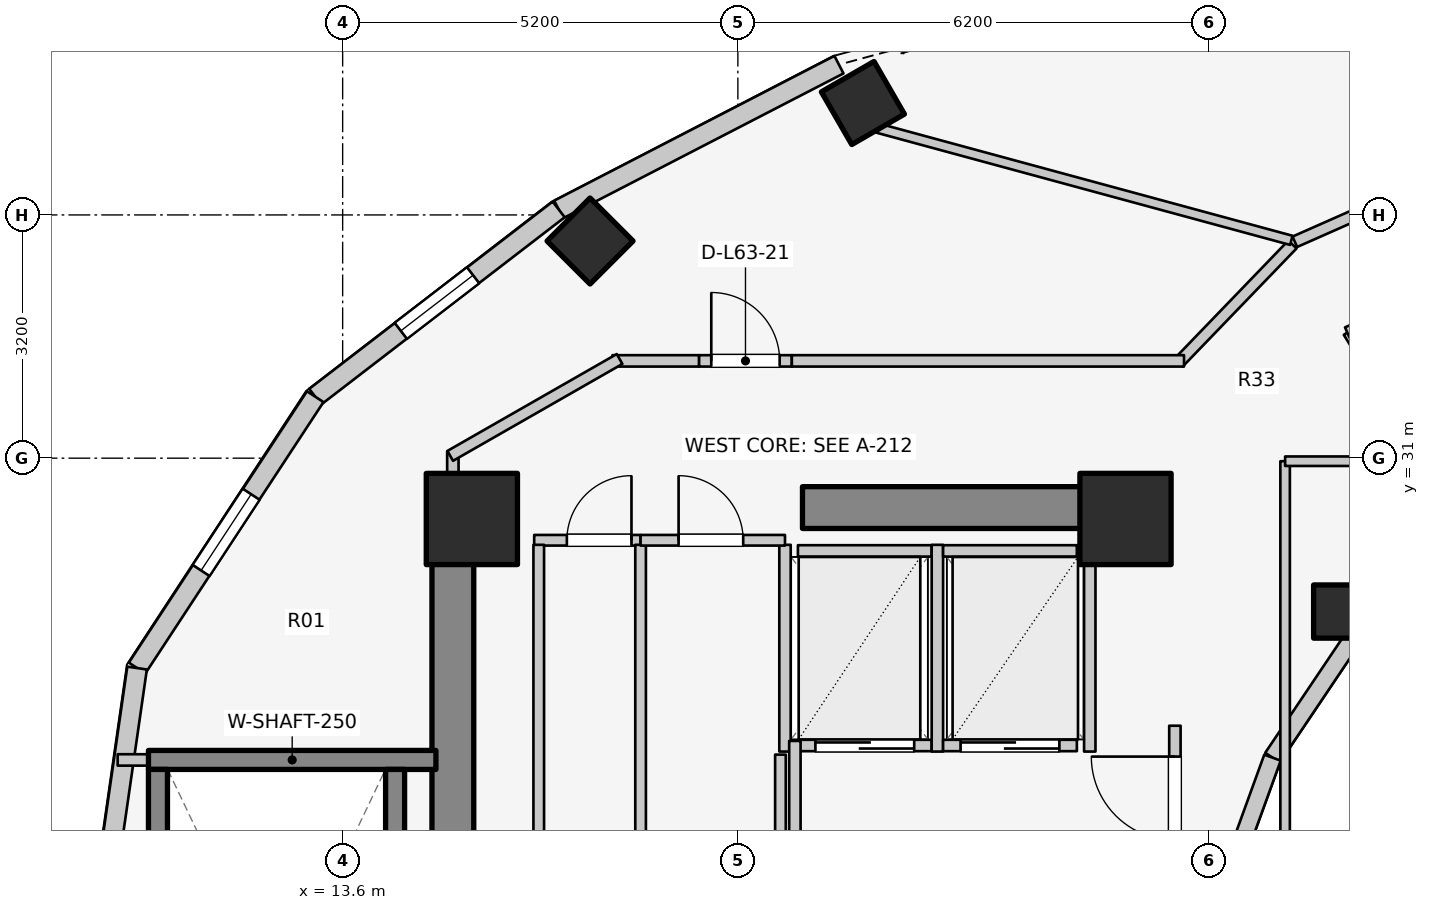
"""IFC4 building model, lengths in metres.
Left out: names, types, materials, properties, quantities, classifications, styles, units other than length and angle.
Written with IfcOpenShell. Run it as: python <this file> out.ifc"""

import sys

from ifc_helpers import new_model, si_unit, direction, frame, frame_2d, origin, origin_2d, place, context, subcontext, project, spatial, rectangle, extrude, element, fill, save


model = new_model("IFC4")
c1 = context("Model", 3, precision=1e-05, world=origin(), true_north=direction((0.0, 1.0)))
c2 = subcontext(c1, "Body", "Model", "MODEL_VIEW")
j1 = project(units=[si_unit("LENGTHUNIT", "METRE"), si_unit("PLANEANGLEUNIT", "RADIAN")], contexts=[c1])
p1 = place(None, origin())
s1 = spatial("IfcSite", under=j1, at=p1, CompositionType="ELEMENT")
p2 = place(p1, origin())
s2 = spatial("IfcBuilding", under=s1, at=p2, CompositionType="ELEMENT")
p3 = place(p2, frame((0.0, 0.0, 207.8)))
s3 = spatial("IfcBuildingStorey", under=s2, at=p3, CompositionType="ELEMENT", Elevation=207.8)
p4 = place(p3, frame((15.05, 17.05, 0.0), z_axis=(0.0, 0.0, 1.0), x_axis=(0.0, 1.0, 0.0)))
e1 = element("IfcWall", 1, at=p4, inside=s3, PredefinedType="SHEAR", context=c2, shape_type="SweptSolid", body=[
    extrude(rectangle(XDim=12.8, YDim=0.55, at=frame_2d((6.4, 0.0))), origin(), (0.0, 0.0, 1.0), 3.1),
])
p5 = place(p3, frame((19.65, 30.35, 0.0), z_axis=(0.0, 0.0, 1.0), x_axis=(1.0, 0.0, 0.0)))
e2 = element("IfcWall", 2, at=p5, inside=s3, PredefinedType="SHEAR", context=c2, shape_type="SweptSolid", body=[
    extrude(rectangle(XDim=4.5, YDim=0.55, at=frame_2d((2.25, 0.0))), origin(), (0.0, 0.0, 1.0), 3.1),
])
p6 = place(p3, frame((11.045, 27.03, 0.0), z_axis=(0.0, 0.0, 1.0), x_axis=(1.0, 0.0, 0.0)))
e3 = element("IfcWall", 3, at=p6, inside=s3, PredefinedType="SOLIDWALL", context=c2, shape_type="SweptSolid", body=[
    extrude(rectangle(XDim=3.782, YDim=0.25, at=frame_2d((1.891, 0.0))), origin(), (0.0, 0.0, 1.0), 3.1),
])
for number, where, z_axis, x_axis in (
    (4, (11.17, 19.095, 0.0), (0.0, 0.0, 1.0), (0.0, 1.0, 0.0)),
    (5, (14.29, 19.095, 0.0), (0.0, 0.0, 1.0), (0.0, 1.0, 0.0)),
):
    element("IfcWall", number, at=place(p3, frame(where, z_axis=z_axis, x_axis=x_axis)), inside=s3, PredefinedType="SOLIDWALL", context=c2, shape_type="SweptSolid", body=[
        extrude(rectangle(XDim=7.81, YDim=0.25, at=frame_2d((3.905, 0.0))), origin(), (0.0, 0.0, 1.0), 3.1),
    ])
for number, where, z_axis, x_axis in (
    (6, (23.9, 30.2, 0.0), (0.0, 0.0, 1.0), (1.0, 0.0, 0.0)),
    (7, (15.3, 30.2, 0.0), (0.0, 0.0, 1.0), (1.0, 0.0, 0.0)),
):
    element("IfcColumn", number, at=place(p3, frame(where, z_axis=z_axis, x_axis=x_axis)), inside=s3, PredefinedType="COLUMN", context=c2, shape_type="SweptSolid", body=[
        extrude(rectangle(XDim=1.2, YDim=1.2, at=origin_2d()), origin(), (0.0, 0.0, 1.0), 3.1),
    ])
p7 = place(p3, frame((20.445, 35.673, 0.0), z_axis=(0.0, 0.0, 1.0), x_axis=(-0.5, 0.866025403784, 0.0)))
e8 = element("IfcColumn", 8, at=p7, inside=s3, PredefinedType="COLUMN", context=c2, shape_type="SweptSolid", body=[
    extrude(rectangle(XDim=0.8, YDim=0.8, at=origin_2d()), origin(), (0.0, 0.0, 1.0), 3.1),
])
p8 = place(p3, frame((26.725, 28.982, 0.0), z_axis=(0.0, 0.0, 1.0), x_axis=(1.0, 0.0, 0.0)))
e9 = element("IfcColumn", 9, at=p8, inside=s3, PredefinedType="COLUMN", context=c2, shape_type="SweptSolid", body=[
    extrude(rectangle(XDim=0.7, YDim=0.7, at=origin_2d()), origin(), (0.0, 0.0, 1.0), 3.1),
])
p9 = place(p3, frame((16.855, 33.857, 0.0), z_axis=(0.0, 0.0, 1.0), x_axis=(-0.707106781187, 0.707106781187, 0.0)))
e10 = element("IfcColumn", 10, at=p9, inside=s3, PredefinedType="COLUMN", context=c2, shape_type="SweptSolid", body=[
    extrude(rectangle(XDim=0.8, YDim=0.8, at=origin_2d()), origin(), (0.0, 0.0, 1.0), 3.1),
])
p10 = place(p3, frame((26.965, 28.742, 0.0), z_axis=(0.0, 0.0, 1.0), x_axis=(-0.558197800898, -0.829707909492, 0.0)))
e11 = element("IfcWall", 11, at=p10, inside=s3, PredefinedType="STANDARD", context=c2, shape_type="SweptSolid", body=[
    extrude(rectangle(XDim=2.027, YDim=0.23, at=frame_2d((1.013, 0.0))), origin(), (0.0, 0.0, 1.0), 1.22),
])
p11 = place(p3, frame((25.834, 27.06, 0.0), z_axis=(0.0, 0.0, 1.0), x_axis=(-0.341423187295, -0.93990968033, 0.0)))
e12 = element("IfcWall", 12, at=p11, inside=s3, PredefinedType="STANDARD", context=c2, shape_type="SweptSolid", body=[
    extrude(rectangle(XDim=2.084, YDim=0.23, at=frame_2d((1.042, 0.0))), origin(), (0.0, 0.0, 1.0), 2.56),
])
p12 = place(p3, frame((20.13, 36.177, 0.0), z_axis=(0.0, 0.0, 1.0), x_axis=(-0.88849146803, -0.458893137057, 0.0)))
e13 = element("IfcWall", 13, at=p12, inside=s3, PredefinedType="STANDARD", context=c2, shape_type="SweptSolid", body=[
    extrude(rectangle(XDim=4.15, YDim=0.26, at=frame_2d((2.075, 0.0))), origin(), (0.0, 0.0, 1.0), 1.22),
])
p13 = place(p3, frame((16.442, 34.272, 0.0), z_axis=(0.0, 0.0, 1.0), x_axis=(-0.792713817907, -0.609593965603, 0.0)))
e14 = element("IfcWall", 14, at=p13, inside=s3, PredefinedType="STANDARD", context=c2, shape_type="SweptSolid", body=[
    extrude(rectangle(XDim=4.041, YDim=0.26, at=frame_2d((2.021, 0.0))), origin(), (0.0, 0.0, 1.0), 1.22),
])
p14 = place(p13, frame((1.42, 0.0, 0.15)))
e15 = element("IfcOpeningElement", 15, at=p14, cuts=e14, PredefinedType="OPENING", context=c2, shape_type="SweptSolid", body=[
    extrude(rectangle(XDim=1.2, YDim=0.9, at=frame_2d((0.6, 0.45))), frame((0.0, 0.14, 0.0), z_axis=(0.0, -1.0, 0.0), x_axis=(1.0, 0.0, 0.0)), (0.0, 0.0, 1.0), 0.28),
])
p15 = place(p3, frame((13.239, 31.809, 0.0), z_axis=(0.0, 0.0, 1.0), x_axis=(-0.548776305075, -0.835969238064, 0.0)))
e16 = element("IfcWall", 16, at=p15, inside=s3, PredefinedType="STANDARD", context=c2, shape_type="SweptSolid", body=[
    extrude(rectangle(XDim=4.271, YDim=0.26, at=frame_2d((2.135, 0.0))), origin(), (0.0, 0.0, 1.0), 1.22),
])
p16 = place(p15, frame((1.535, 0.0, 0.15)))
e17 = element("IfcOpeningElement", 17, at=p16, cuts=e16, PredefinedType="OPENING", context=c2, shape_type="SweptSolid", body=[
    extrude(rectangle(XDim=1.2, YDim=0.9, at=frame_2d((0.6, 0.45))), frame((0.0, 0.14, 0.0), z_axis=(0.0, -1.0, 0.0), x_axis=(1.0, 0.0, 0.0)), (0.0, 0.0, 1.0), 0.28),
])
p17 = place(p3, frame((10.895, 28.239, 0.0), z_axis=(0.0, 0.0, 1.0), x_axis=(-0.142712754019, -0.989764148593, 0.0)))
e18 = element("IfcWall", 18, at=p17, inside=s3, PredefinedType="STANDARD", context=c2, shape_type="SweptSolid", body=[
    extrude(rectangle(XDim=5.293, YDim=0.26, at=frame_2d((2.646, 0.0))), origin(), (0.0, 0.0, 1.0), 2.57),
])
p18 = place(p17, frame((2.635, 0.0, 0.75)))
e19 = element("IfcOpeningElement", 19, at=p18, cuts=e18, PredefinedType="OPENING", context=c2, shape_type="SweptSolid", body=[
    extrude(rectangle(XDim=1.2, YDim=1.5, at=frame_2d((0.6, 0.75))), frame((0.0, 0.14, 0.0), z_axis=(0.0, -1.0, 0.0), x_axis=(1.0, 0.0, 0.0)), (0.0, 0.0, 1.0), 0.28),
])
p19 = place(p3, frame((19.59, 27.22, 0.0), z_axis=(0.0, 0.0, 1.0), x_axis=(1.0, 0.0, 0.0)))
e20 = element("IfcWall", 20, at=p19, inside=s3, PredefinedType="SOLIDWALL", context=c2, shape_type="SweptSolid", body=[
    extrude(rectangle(XDim=1.76, YDim=0.15, at=frame_2d((0.88, 0.0))), origin(), (0.0, 0.0, 1.0), 2.575),
])
p20 = place(p19, frame((0.23, 0.0, 0.0)))
e21 = element("IfcOpeningElement", 21, at=p20, cuts=e20, PredefinedType="OPENING", context=c2, shape_type="SweptSolid", body=[
    extrude(rectangle(XDim=1.3, YDim=2.1, at=frame_2d((0.65, 1.05))), frame((0.0, 0.085, 0.0), z_axis=(0.0, -1.0, 0.0), x_axis=(1.0, 0.0, 0.0)), (0.0, 0.0, 1.0), 0.17),
])
p21 = place(p3, frame((19.59, 29.78, 0.0), z_axis=(0.0, 0.0, 1.0), x_axis=(1.0, 0.0, 0.0)))
e22 = element("IfcWall", 22, at=p21, inside=s3, PredefinedType="SOLIDWALL", context=c2, shape_type="SweptSolid", body=[
    extrude(rectangle(XDim=1.76, YDim=0.15, at=frame_2d((0.88, 0.0))), origin(), (0.0, 0.0, 1.0), 2.575),
])
for number, where, z_axis, x_axis in (
    (23, (19.42, 27.14, 0.0), (0.0, 0.0, 1.0), (0.0, 1.0, 0.0)),
    (24, (21.425, 27.14, 0.0), (0.0, 0.0, 1.0), (0.0, 1.0, 0.0)),
):
    element("IfcWall", number, at=place(p3, frame(where, z_axis=z_axis, x_axis=x_axis)), inside=s3, PredefinedType="SOLIDWALL", context=c2, shape_type="SweptSolid", body=[
        extrude(rectangle(XDim=2.72, YDim=0.15, at=frame_2d((1.36, 0.0))), origin(), (0.0, 0.0, 1.0), 2.575),
    ])
p22 = place(p3, frame((21.5, 27.22, 0.0), z_axis=(0.0, 0.0, 1.0), x_axis=(1.0, 0.0, 0.0)))
e25 = element("IfcWall", 25, at=p22, inside=s3, PredefinedType="SOLIDWALL", context=c2, shape_type="SweptSolid", body=[
    extrude(rectangle(XDim=1.76, YDim=0.15, at=frame_2d((0.88, 0.0))), origin(), (0.0, 0.0, 1.0), 2.575),
])
p23 = place(p22, frame((0.23, 0.0, 0.0)))
e26 = element("IfcOpeningElement", 26, at=p23, cuts=e25, PredefinedType="OPENING", context=c2, shape_type="SweptSolid", body=[
    extrude(rectangle(XDim=1.3, YDim=2.1, at=frame_2d((0.65, 1.05))), frame((0.0, 0.085, 0.0), z_axis=(0.0, -1.0, 0.0), x_axis=(1.0, 0.0, 0.0)), (0.0, 0.0, 1.0), 0.17),
])
p24 = place(p3, frame((21.5, 29.78, 0.0), z_axis=(0.0, 0.0, 1.0), x_axis=(1.0, 0.0, 0.0)))
e27 = element("IfcWall", 27, at=p24, inside=s3, PredefinedType="SOLIDWALL", context=c2, shape_type="SweptSolid", body=[
    extrude(rectangle(XDim=1.76, YDim=0.15, at=frame_2d((0.88, 0.0))), origin(), (0.0, 0.0, 1.0), 2.575),
])
p25 = place(p3, frame((23.43, 27.14, 0.0), z_axis=(0.0, 0.0, 1.0), x_axis=(0.0, 1.0, 0.0)))
e28 = element("IfcWall", 28, at=p25, inside=s3, PredefinedType="SOLIDWALL", context=c2, shape_type="SweptSolid", body=[
    extrude(rectangle(XDim=2.72, YDim=0.15, at=frame_2d((1.36, 0.0))), origin(), (0.0, 0.0, 1.0), 2.575),
])
p26 = place(p3, frame((19.55, 24.08, 0.0), z_axis=(0.0, 0.0, 1.0), x_axis=(0.0, 1.0, 0.0)))
e29 = element("IfcWall", 29, at=p26, inside=s3, PredefinedType="PARTITIONING", context=c2, shape_type="SweptSolid", body=[
    extrude(rectangle(XDim=3.2, YDim=0.15, at=frame_2d((1.6, 0.0))), origin(), (0.0, 0.0, 1.0), 2.575),
])
p27 = place(p3, frame((24.55, 24.08, 0.0), z_axis=(0.0, 0.0, 1.0), x_axis=(0.0, 1.0, 0.0)))
e30 = element("IfcWall", 30, at=p27, inside=s3, PredefinedType="PARTITIONING", context=c2, shape_type="SweptSolid", body=[
    extrude(rectangle(XDim=3.4, YDim=0.15, at=frame_2d((1.7, 0.0))), origin(), (0.0, 0.0, 1.0), 2.575),
])
p28 = place(p27, frame((1.894, 0.0, 0.0)))
e31 = element("IfcOpeningElement", 31, at=p28, cuts=e30, PredefinedType="OPENING", context=c2, shape_type="SweptSolid", body=[
    extrude(rectangle(XDim=1.1, YDim=2.1, at=frame_2d((0.55, 1.05))), frame((0.0, 0.085, 0.0), z_axis=(0.0, -1.0, 0.0), x_axis=(1.0, 0.0, 0.0)), (0.0, 0.0, 1.0), 0.17),
])
p29 = place(p3, frame((16.12, 29.92, 0.0), z_axis=(0.0, 0.0, 1.0), x_axis=(1.0, 0.0, 0.0)))
e32 = element("IfcWall", 32, at=p29, inside=s3, PredefinedType="PLUMBINGWALL", context=c2, shape_type="SweptSolid", body=[
    extrude(rectangle(XDim=1.4, YDim=0.14, at=frame_2d((0.7, 0.0))), origin(), (0.0, 0.0, 1.0), 2.575),
])
p30 = place(p29, frame((0.43, 0.0, 0.0)))
e33 = element("IfcOpeningElement", 33, at=p30, cuts=e32, PredefinedType="OPENING", context=c2, shape_type="SweptSolid", body=[
    extrude(rectangle(XDim=0.85, YDim=2.05, at=frame_2d((0.425, 1.025))), frame((0.0, 0.08, 0.0), z_axis=(0.0, -1.0, 0.0), x_axis=(1.0, 0.0, 0.0)), (0.0, 0.0, 1.0), 0.16),
])
for number, where, z_axis, x_axis in (
    (34, (16.18, 25.98, 0.0), (0.0, 0.0, 1.0), (0.0, 1.0, 0.0)),
    (35, (17.52, 25.98, 0.0), (0.0, 0.0, 1.0), (0.0, 1.0, 0.0)),
):
    element("IfcWall", number, at=place(p3, frame(where, z_axis=z_axis, x_axis=x_axis)), inside=s3, PredefinedType="PLUMBINGWALL", context=c2, shape_type="SweptSolid", body=[
        extrude(rectangle(XDim=3.88, YDim=0.14, at=frame_2d((1.94, 0.0))), origin(), (0.0, 0.0, 1.0), 2.575),
    ])
p31 = place(p3, frame((17.52, 29.92, 0.0), z_axis=(0.0, 0.0, 1.0), x_axis=(1.0, 0.0, 0.0)))
e36 = element("IfcWall", 36, at=p31, inside=s3, PredefinedType="PLUMBINGWALL", context=c2, shape_type="SweptSolid", body=[
    extrude(rectangle(XDim=1.9, YDim=0.14, at=frame_2d((0.95, 0.0))), origin(), (0.0, 0.0, 1.0), 2.575),
])
p32 = place(p31, frame((0.5, 0.0, 0.0)))
e37 = element("IfcOpeningElement", 37, at=p32, cuts=e36, PredefinedType="OPENING", context=c2, shape_type="SweptSolid", body=[
    extrude(rectangle(XDim=0.85, YDim=2.05, at=frame_2d((0.425, 1.025))), frame((0.0, 0.08, 0.0), z_axis=(0.0, -1.0, 0.0), x_axis=(1.0, 0.0, 0.0)), (0.0, 0.0, 1.0), 0.16),
])
p33 = place(p3, frame((19.36, 25.98, 0.0), z_axis=(0.0, 0.0, 1.0), x_axis=(0.0, 1.0, 0.0)))
e38 = element("IfcWall", 38, at=p33, inside=s3, PredefinedType="PLUMBINGWALL", context=c2, shape_type="SweptSolid", body=[
    extrude(rectangle(XDim=1.12, YDim=0.14, at=frame_2d((0.56, 0.0))), origin(), (0.0, 0.0, 1.0), 2.575),
])
p34 = place(p3, frame((28.45, 30.015, 0.0), z_axis=(0.0, 0.0, 1.0), x_axis=(-0.523992004803, 0.851723182086, 0.0)))
e39 = element("IfcWall", 39, at=p34, inside=s3, PredefinedType="PARTITIONING", context=c2, shape_type="SweptSolid", body=[
    extrude(rectangle(XDim=3.101, YDim=0.125, at=frame_2d((1.551, 0.0))), origin(), (0.0, 0.0, 1.0), 2.096),
])
p35 = place(p3, frame((27.045, 32.753, 0.0), z_axis=(0.0, 0.0, 1.0), x_axis=(-0.913282054518, -0.407327741378, 0.0)))
e40 = element("IfcWall", 40, at=p35, inside=s3, PredefinedType="PARTITIONING", context=c2, shape_type="SweptSolid", body=[
    extrude(rectangle(XDim=0.248, YDim=0.15, at=frame_2d((0.124, 0.0))), origin(), (0.0, 0.0, 1.0), 2.575),
])
p36 = place(p3, frame((26.0, 25.8, 0.0), z_axis=(0.0, 0.0, 1.0), x_axis=(0.0, 1.0, 0.0)))
e41 = element("IfcWall", 41, at=p36, inside=s3, PredefinedType="PARTITIONING", context=c2, shape_type="SweptSolid", body=[
    extrude(rectangle(XDim=5.16, YDim=0.125, at=frame_2d((2.58, 0.0))), origin(), (0.0, 0.0, 1.0), 1.952),
])
p37 = place(p3, frame((26.0, 30.96, 0.0), z_axis=(0.0, 0.0, 1.0), x_axis=(1.0, 0.0, 0.0)))
e42 = element("IfcWall", 42, at=p37, inside=s3, PredefinedType="PARTITIONING", context=c2, shape_type="SweptSolid", body=[
    extrude(rectangle(XDim=2.6, YDim=0.125, at=frame_2d((1.3, 0.0))), origin(), (0.0, 0.0, 1.0), 2.096),
])
p38 = place(p3, frame((10.64, 27.03, 0.0), z_axis=(0.0, 0.0, 1.0), x_axis=(1.0, 0.0, 0.0)))
e43 = element("IfcWall", 43, at=p38, inside=s3, PredefinedType="PARTITIONING", context=c2, shape_type="SweptSolid", body=[
    extrude(rectangle(XDim=0.4, YDim=0.15, at=frame_2d((0.2, 0.0))), origin(), (0.0, 0.0, 1.0), 2.575),
])
p39 = place(p3, frame((15.05, 29.8, 0.0), z_axis=(0.0, 0.0, 1.0), x_axis=(0.0, 1.0, 0.0)))
e44 = element("IfcWall", 44, at=p39, inside=s3, PredefinedType="PARTITIONING", context=c2, shape_type="SweptSolid", body=[
    extrude(rectangle(XDim=1.29, YDim=0.15, at=frame_2d((0.645, 0.0))), origin(), (0.0, 0.0, 1.0), 1.22),
])
p40 = place(p3, frame((26.097, 33.812, 0.0), z_axis=(0.0, 0.0, 1.0), x_axis=(-0.694032962553, -0.719943224768, 0.0)))
e45 = element("IfcWall", 45, at=p40, inside=s3, PredefinedType="PARTITIONING", context=c2, shape_type="SweptSolid", body=[
    extrude(rectangle(XDim=2.158, YDim=0.15, at=frame_2d((1.079, 0.0))), origin(), (0.0, 0.0, 1.0), 2.096),
])
p41 = place(p3, frame((17.15, 32.28, 0.0), z_axis=(0.0, 0.0, 1.0), x_axis=(1.0, 0.0, 0.0)))
e46 = element("IfcWall", 46, at=p41, inside=s3, PredefinedType="PARTITIONING", context=c2, shape_type="SweptSolid", body=[
    extrude(rectangle(XDim=1.14, YDim=0.15, at=frame_2d((0.57, 0.0))), origin(), (0.0, 0.0, 1.0), 2.575),
])
p42 = place(p3, frame((18.29, 32.28, 0.0), z_axis=(0.0, 0.0, 1.0), x_axis=(1.0, 0.0, 0.0)))
e47 = element("IfcWall", 47, at=p42, inside=s3, PredefinedType="PARTITIONING", context=c2, shape_type="SweptSolid", body=[
    extrude(rectangle(XDim=1.22, YDim=0.15, at=frame_2d((0.61, 0.0))), origin(), (0.0, 0.0, 1.0), 2.16),
])
p43 = place(p42, frame((0.16, 0.0, 0.0)))
e48 = element("IfcOpeningElement", 48, at=p43, cuts=e47, PredefinedType="OPENING", context=c2, shape_type="SweptSolid", body=[
    extrude(rectangle(XDim=0.9, YDim=2.1, at=frame_2d((0.45, 1.05))), frame((0.0, 0.085, 0.0), z_axis=(0.0, -1.0, 0.0), x_axis=(1.0, 0.0, 0.0)), (0.0, 0.0, 1.0), 0.17),
])
p44 = place(p3, frame((19.51, 32.28, 0.0), z_axis=(0.0, 0.0, 1.0), x_axis=(1.0, 0.0, 0.0)))
e49 = element("IfcWall", 49, at=p44, inside=s3, PredefinedType="PARTITIONING", context=c2, shape_type="SweptSolid", body=[
    extrude(rectangle(XDim=5.16, YDim=0.15, at=frame_2d((2.58, 0.0))), origin(), (0.0, 0.0, 1.0), 2.096),
])
p45 = place(p3, frame((17.243, 32.305, 0.0), z_axis=(0.0, 0.0, 1.0), x_axis=(-0.867991349648, -0.496579315857, 0.0)))
e50 = element("IfcWall", 50, at=p45, inside=s3, PredefinedType="PARTITIONING", context=c2, shape_type="SweptSolid", body=[
    extrude(rectangle(XDim=2.567, YDim=0.15, at=frame_2d((1.283, 0.0))), origin(), (0.0, 0.0, 1.0), 1.22),
])
p46 = place(p3, frame((26.082, 33.866, 0.0), z_axis=(0.0, 0.0, 1.0), x_axis=(-0.965109390289, 0.261847025523, 0.0)))
e51 = element("IfcWall", 51, at=p46, inside=s3, PredefinedType="PARTITIONING", context=c2, shape_type="SweptSolid", body=[
    extrude(rectangle(XDim=5.644, YDim=0.125, at=frame_2d((2.822, 0.0))), origin(), (0.0, 0.0, 1.0), 1.22),
])
p47 = place(p3, frame((27.335, 34.381, 0.0), z_axis=(0.0, 0.0, 1.0), x_axis=(-0.914481389177, -0.404627963503, 0.0)))
e52 = element("IfcWall", 52, at=p47, inside=s3, PredefinedType="PARTITIONING", context=c2, shape_type="SweptSolid", body=[
    extrude(rectangle(XDim=1.32, YDim=0.15, at=frame_2d((0.66, 0.0))), origin(), (0.0, 0.0, 1.0), 2.096),
])
p48 = place(p14, origin())
e53 = element("IfcWindow", 53, at=p48, inside=s3, PartitioningType="SINGLE_PANEL", PredefinedType="WINDOW", context=c2, shape_type="SweptSolid", body=[
    extrude(rectangle(XDim=1.2, YDim=0.9, at=frame_2d((0.6, 0.45))), frame((0.0, 0.03, 0.0), z_axis=(0.0, -1.0, 0.0), x_axis=(1.0, 0.0, 0.0)), (0.0, 0.0, 1.0), 0.06),
])
fill(e15, e53)
p49 = place(p16, origin())
e54 = element("IfcWindow", 54, at=p49, inside=s3, PartitioningType="SINGLE_PANEL", PredefinedType="WINDOW", context=c2, shape_type="SweptSolid", body=[
    extrude(rectangle(XDim=1.2, YDim=0.9, at=frame_2d((0.6, 0.45))), frame((0.0, 0.03, 0.0), z_axis=(0.0, -1.0, 0.0), x_axis=(1.0, 0.0, 0.0)), (0.0, 0.0, 1.0), 0.06),
])
fill(e17, e54)
p50 = place(p20, origin())
e55 = element("IfcDoor", 55, at=p50, inside=s3, OperationType="DOUBLE_DOOR_SLIDING", PredefinedType="DOOR", context=c2, shape_type="SweptSolid", body=[
    extrude(rectangle(XDim=1.3, YDim=2.1, at=frame_2d((0.65, 1.05))), frame((0.0, 0.025, 0.0), z_axis=(0.0, -1.0, 0.0), x_axis=(1.0, 0.0, 0.0)), (0.0, 0.0, 1.0), 0.05),
])
fill(e21, e55)
p51 = place(p23, origin())
e56 = element("IfcDoor", 56, at=p51, inside=s3, OperationType="DOUBLE_DOOR_SLIDING", PredefinedType="DOOR", context=c2, shape_type="SweptSolid", body=[
    extrude(rectangle(XDim=1.3, YDim=2.1, at=frame_2d((0.65, 1.05))), frame((0.0, 0.025, 0.0), z_axis=(0.0, -1.0, 0.0), x_axis=(1.0, 0.0, 0.0)), (0.0, 0.0, 1.0), 0.05),
])
fill(e26, e56)
p52 = place(p28, origin())
e57 = element("IfcDoor", 57, at=p52, inside=s3, OperationType="SINGLE_SWING_RIGHT", PredefinedType="DOOR", context=c2, shape_type="SweptSolid", body=[
    extrude(rectangle(XDim=1.1, YDim=2.1, at=frame_2d((0.55, 1.05))), frame((0.0, 0.025, 0.0), z_axis=(0.0, -1.0, 0.0), x_axis=(1.0, 0.0, 0.0)), (0.0, 0.0, 1.0), 0.05),
])
fill(e31, e57)
p53 = place(p30, origin())
e58 = element("IfcDoor", 58, at=p53, inside=s3, OperationType="SINGLE_SWING_RIGHT", PredefinedType="DOOR", context=c2, shape_type="SweptSolid", body=[
    extrude(rectangle(XDim=0.85, YDim=2.05, at=frame_2d((0.425, 1.025))), frame((0.0, 0.025, 0.0), z_axis=(0.0, -1.0, 0.0), x_axis=(1.0, 0.0, 0.0)), (0.0, 0.0, 1.0), 0.05),
])
fill(e33, e58)
p54 = place(p32, origin())
e59 = element("IfcDoor", 59, at=p54, inside=s3, OperationType="SINGLE_SWING_LEFT", PredefinedType="DOOR", context=c2, shape_type="SweptSolid", body=[
    extrude(rectangle(XDim=0.85, YDim=2.05, at=frame_2d((0.425, 1.025))), frame((0.0, 0.025, 0.0), z_axis=(0.0, -1.0, 0.0), x_axis=(1.0, 0.0, 0.0)), (0.0, 0.0, 1.0), 0.05),
])
fill(e37, e59)
p55 = place(p43, origin())
e60 = element("IfcDoor", 60, at=p55, inside=s3, OperationType="SINGLE_SWING_LEFT", PredefinedType="DOOR", context=c2, shape_type="SweptSolid", body=[
    extrude(rectangle(XDim=0.9, YDim=2.1, at=frame_2d((0.45, 1.05))), frame((0.0, 0.025, 0.0), z_axis=(0.0, -1.0, 0.0), x_axis=(1.0, 0.0, 0.0)), (0.0, 0.0, 1.0), 0.05),
])
fill(e48, e60)
save(model, sys.argv[1])
